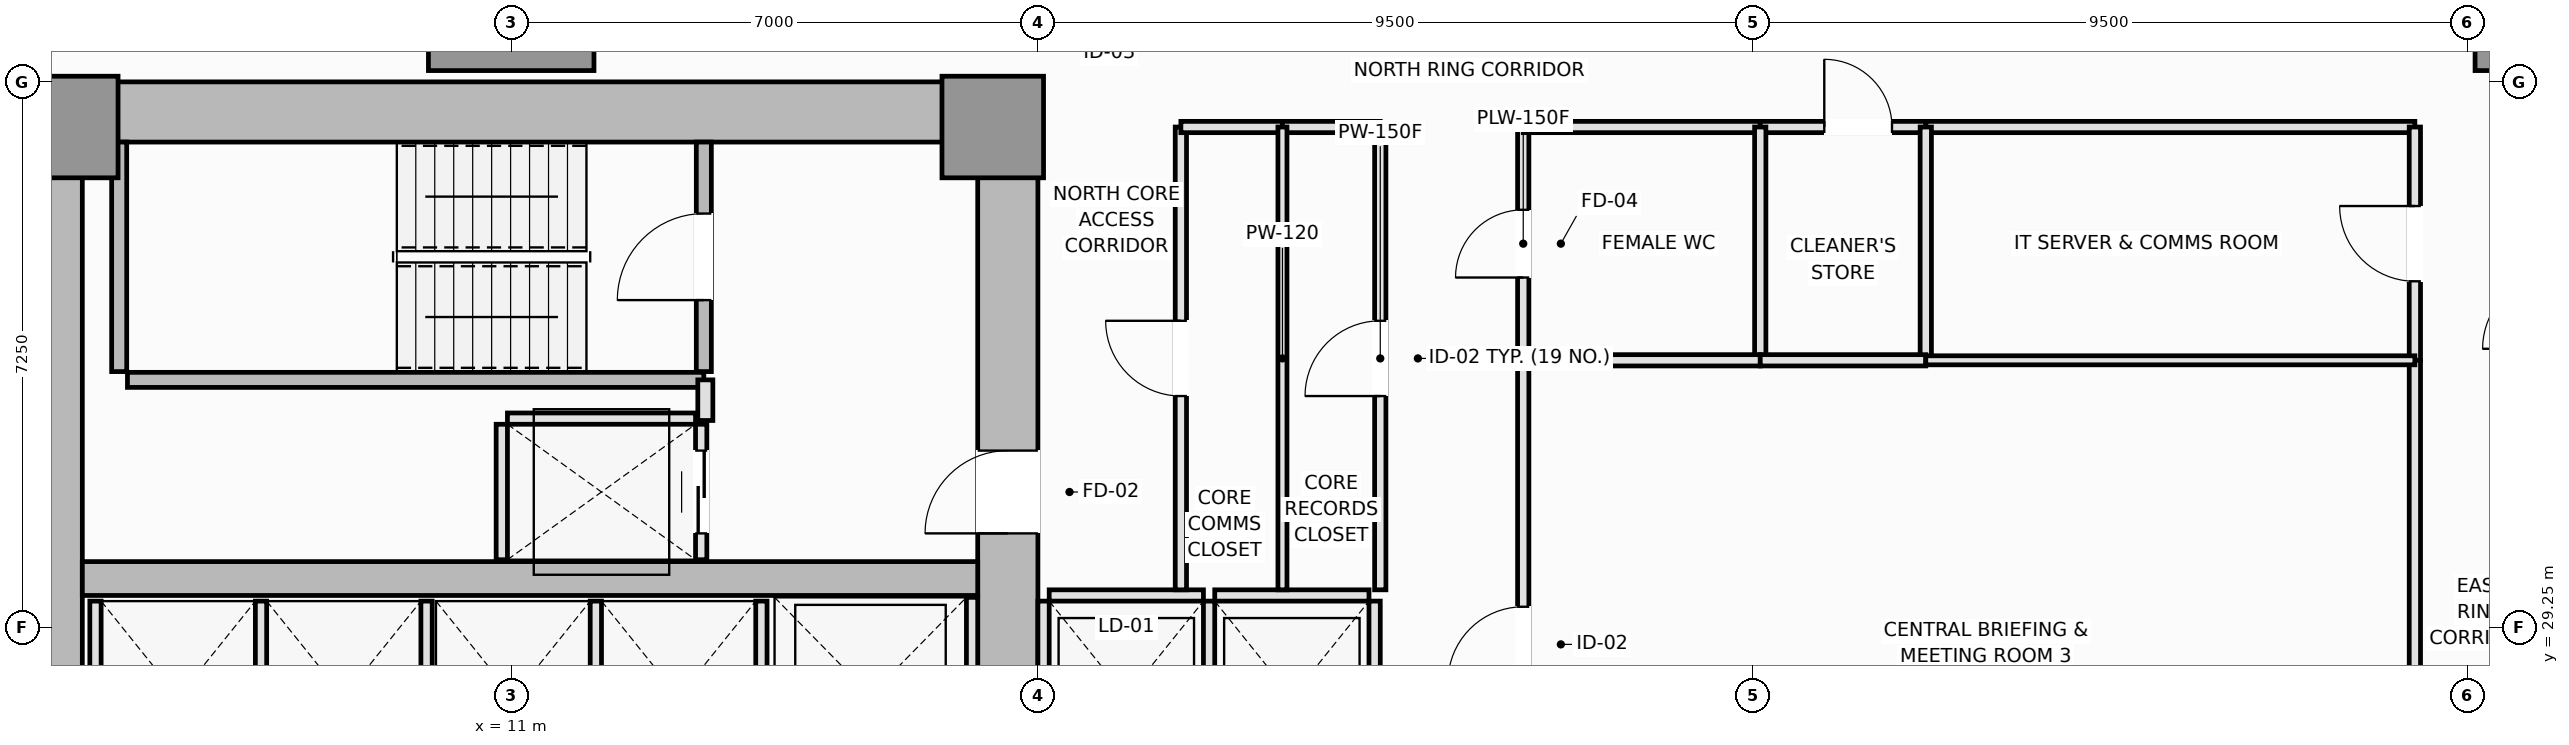
"""IFC4 building model, lengths in metres.
Left out: names, types, materials, properties, quantities, classifications, styles, units other than length and angle.
Written with IfcOpenShell. Run it as: python <this file> out.ifc"""

import sys

from ifc_helpers import new_model, si_unit, direction, frame, frame_2d, origin, origin_2d, place, context, subcontext, project, spatial, rectangle, extrude, element, fill, save


model = new_model("IFC4")
c1 = context("Model", 3, precision=1e-05, world=origin(), true_north=direction((0.0, 1.0)))
c2 = subcontext(c1, "Body", "Model", "MODEL_VIEW")
j1 = project(units=[si_unit("LENGTHUNIT", "METRE"), si_unit("PLANEANGLEUNIT", "RADIAN")], contexts=[c1])
p1 = place(None, origin())
s1 = spatial("IfcSite", under=j1, at=p1, CompositionType="ELEMENT")
p2 = place(p1, origin())
s2 = spatial("IfcBuilding", under=s1, at=p2, CompositionType="ELEMENT")
p3 = place(p2, frame((0.0, 0.0, 57.55)))
s3 = spatial("IfcBuildingStorey", under=s2, at=p3, CompositionType="ELEMENT", Elevation=57.55)
p4 = place(p3, frame((4.5, 36.1, 0.0), z_axis=(0.0, 0.0, 1.0), x_axis=(1.0, 0.0, 0.0)))
e1 = element("IfcWall", 1, at=p4, inside=s3, PredefinedType="SHEAR", context=c2, shape_type="SweptSolid", body=[
    extrude(rectangle(XDim=13.5, YDim=0.8, at=frame_2d((6.75, 0.0))), origin(), (0.0, 0.0, 1.0), 3.55),
])
p5 = place(p3, frame((4.9, 14.8, 0.0), z_axis=(0.0, 0.0, 1.0), x_axis=(0.0, 1.0, 0.0)))
e2 = element("IfcWall", 2, at=p5, inside=s3, PredefinedType="SHEAR", context=c2, shape_type="SweptSolid", body=[
    extrude(rectangle(XDim=20.9, YDim=0.8, at=frame_2d((10.45, 0.0))), origin(), (0.0, 0.0, 1.0), 3.55),
])
p6 = place(p3, frame((17.6, 27.05, 0.0), z_axis=(0.0, 0.0, 1.0), x_axis=(0.0, 1.0, 0.0)))
e3 = element("IfcWall", 3, at=p6, inside=s3, PredefinedType="SHEAR", context=c2, shape_type="SweptSolid", body=[
    extrude(rectangle(XDim=8.65, YDim=0.8, at=frame_2d((4.325, 0.0))), origin(), (0.0, 0.0, 1.0), 3.55),
])
p7 = place(p6, frame((3.45, 0.0, 0.0)))
e4 = element("IfcOpeningElement", 4, at=p7, cuts=e3, PredefinedType="OPENING", context=c2, shape_type="SweptSolid", body=[
    extrude(rectangle(XDim=1.1, YDim=2.15, at=frame_2d((0.55, 1.075))), frame((0.0, 0.41, 0.0), z_axis=(0.0, -1.0, 0.0), x_axis=(1.0, 0.0, 0.0)), (0.0, 0.0, 1.0), 0.82),
])
p8 = place(p3, frame((5.3, 29.9, 0.0), z_axis=(0.0, 0.0, 1.0), x_axis=(1.0, 0.0, 0.0)))
e5 = element("IfcWall", 5, at=p8, inside=s3, PredefinedType="SHEAR", context=c2, shape_type="SweptSolid", body=[
    extrude(rectangle(XDim=11.9, YDim=0.45, at=frame_2d((5.95, 0.0))), origin(), (0.0, 0.0, 1.0), 3.55),
])
for number, where, z_axis, x_axis in (
    (6, (5.1, 35.9, 0.0), (0.0, 0.0, 1.0), (1.0, 0.0, 0.0)),
    (7, (17.4, 35.9, 0.0), (0.0, 0.0, 1.0), (1.0, 0.0, 0.0)),
):
    element("IfcColumn", number, at=place(p3, frame(where, z_axis=z_axis, x_axis=x_axis)), inside=s3, PredefinedType="PILASTER", context=c2, shape_type="SweptSolid", body=[
        extrude(rectangle(XDim=1.35, YDim=1.35, at=origin_2d()), origin(), (0.0, 0.0, 1.0), 3.55),
    ])
for number, where, z_axis, x_axis in (
    (8, (11.0, 37.75, 0.0), (0.0, 0.0, 1.0), (1.0, 0.0, 0.0)),
    (9, (38.2, 37.75, 0.0), (0.0, 0.0, 1.0), (1.0, 0.0, 0.0)),
):
    element("IfcColumn", number, at=place(p3, frame(where, z_axis=z_axis, x_axis=x_axis)), inside=s3, PredefinedType="COLUMN", context=c2, shape_type="SweptSolid", body=[
        extrude(rectangle(XDim=2.2, YDim=2.2, at=origin_2d()), origin(), (0.0, 0.0, 1.0), 3.55),
    ])
p9 = place(p3, frame((5.79, 32.65, 0.0), z_axis=(0.0, 0.0, 1.0), x_axis=(0.0, 1.0, 0.0)))
e10 = element("IfcWall", 10, at=p9, inside=s3, PredefinedType="SOLIDWALL", context=c2, shape_type="SweptSolid", body=[
    extrude(rectangle(XDim=3.05, YDim=0.2, at=frame_2d((1.525, 0.0))), origin(), (0.0, 0.0, 1.0), 3.55),
])
p10 = place(p3, frame((5.9, 32.54, 0.0), z_axis=(0.0, 0.0, 1.0), x_axis=(1.0, 0.0, 0.0)))
e11 = element("IfcWall", 11, at=p10, inside=s3, PredefinedType="SOLIDWALL", context=c2, shape_type="SweptSolid", body=[
    extrude(rectangle(XDim=7.66, YDim=0.2, at=frame_2d((3.83, 0.0))), origin(), (0.0, 0.0, 1.0), 3.55),
])
p11 = place(p3, frame((13.56, 32.65, 0.0), z_axis=(0.0, 0.0, 1.0), x_axis=(0.0, 1.0, 0.0)))
e12 = element("IfcWall", 12, at=p11, inside=s3, PredefinedType="SOLIDWALL", context=c2, shape_type="SweptSolid", body=[
    extrude(rectangle(XDim=3.05, YDim=0.2, at=frame_2d((1.525, 0.0))), origin(), (0.0, 0.0, 1.0), 3.55),
])
p12 = place(p11, frame((0.95, 0.0, 0.0)))
e13 = element("IfcOpeningElement", 13, at=p12, cuts=e12, PredefinedType="OPENING", context=c2, shape_type="SweptSolid", body=[
    extrude(rectangle(XDim=1.15, YDim=2.15, at=frame_2d((0.575, 1.075))), frame((0.0, 0.11, 0.0), z_axis=(0.0, -1.0, 0.0), x_axis=(1.0, 0.0, 0.0)), (0.0, 0.0, 1.0), 0.22),
])
p13 = place(p3, frame((18.15, 29.675, 0.0), z_axis=(0.0, 0.0, 1.0), x_axis=(1.0, 0.0, 0.0)))
e14 = element("IfcWall", 14, at=p13, inside=s3, PredefinedType="PARTITIONING", context=c2, shape_type="SweptSolid", body=[
    extrude(rectangle(XDim=2.05, YDim=0.15, at=frame_2d((1.025, 0.0))), origin(), (0.0, 0.0, 1.0), 3.37),
])
for number, where, z_axis, x_axis in (
    (15, (18.075, 27.05, 0.0), (0.0, 0.0, 1.0), (0.0, 1.0, 0.0)),
    (16, (20.275, 27.05, 0.0), (0.0, 0.0, 1.0), (0.0, 1.0, 0.0)),
):
    element("IfcWall", number, at=place(p3, frame(where, z_axis=z_axis, x_axis=x_axis)), inside=s3, PredefinedType="PARTITIONING", context=c2, shape_type="SweptSolid", body=[
        extrude(rectangle(XDim=2.55, YDim=0.15, at=frame_2d((1.275, 0.0))), origin(), (0.0, 0.0, 1.0), 3.37),
    ])
p14 = place(p3, frame((20.35, 29.675, 0.0), z_axis=(0.0, 0.0, 1.0), x_axis=(1.0, 0.0, 0.0)))
e17 = element("IfcWall", 17, at=p14, inside=s3, PredefinedType="PARTITIONING", context=c2, shape_type="SweptSolid", body=[
    extrude(rectangle(XDim=2.05, YDim=0.15, at=frame_2d((1.025, 0.0))), origin(), (0.0, 0.0, 1.0), 3.37),
])
for number, where, z_axis, x_axis in (
    (18, (22.475, 27.05, 0.0), (0.0, 0.0, 1.0), (0.0, 1.0, 0.0)),
    (19, (5.475, 27.05, 0.0), (0.0, 0.0, 1.0), (0.0, 1.0, 0.0)),
    (20, (7.675, 27.05, 0.0), (0.0, 0.0, 1.0), (0.0, 1.0, 0.0)),
    (21, (9.875, 27.05, 0.0), (0.0, 0.0, 1.0), (0.0, 1.0, 0.0)),
    (22, (12.125, 27.05, 0.0), (0.0, 0.0, 1.0), (0.0, 1.0, 0.0)),
    (23, (14.325, 27.05, 0.0), (0.0, 0.0, 1.0), (0.0, 1.0, 0.0)),
):
    element("IfcWall", number, at=place(p3, frame(where, z_axis=z_axis, x_axis=x_axis)), inside=s3, PredefinedType="PARTITIONING", context=c2, shape_type="SweptSolid", body=[
        extrude(rectangle(XDim=2.55, YDim=0.15, at=frame_2d((1.275, 0.0))), origin(), (0.0, 0.0, 1.0), 3.37),
    ])
p15 = place(p3, frame((17.125, 27.05, 0.0), z_axis=(0.0, 0.0, 1.0), x_axis=(0.0, 1.0, 0.0)))
e24 = element("IfcWall", 24, at=p15, inside=s3, PredefinedType="PARTITIONING", context=c2, shape_type="SweptSolid", body=[
    extrude(rectangle(XDim=2.6, YDim=0.15, at=frame_2d((1.3, 0.0))), origin(), (0.0, 0.0, 1.0), 3.37),
])
p16 = place(p3, frame((10.95, 32.025, 0.0), z_axis=(0.0, 0.0, 1.0), x_axis=(1.0, 0.0, 0.0)))
e25 = element("IfcWall", 25, at=p16, inside=s3, PredefinedType="PARTITIONING", context=c2, shape_type="SweptSolid", body=[
    extrude(rectangle(XDim=2.5, YDim=0.15, at=frame_2d((1.25, 0.0))), origin(), (0.0, 0.0, 1.0), 3.37),
])
p17 = place(p3, frame((10.875, 30.15, 0.0), z_axis=(0.0, 0.0, 1.0), x_axis=(0.0, 1.0, 0.0)))
e26 = element("IfcWall", 26, at=p17, inside=s3, PredefinedType="PARTITIONING", context=c2, shape_type="SweptSolid", body=[
    extrude(rectangle(XDim=1.8, YDim=0.15, at=frame_2d((0.9, 0.0))), origin(), (0.0, 0.0, 1.0), 3.37),
])
p18 = place(p3, frame((13.525, 30.15, 0.0), z_axis=(0.0, 0.0, 1.0), x_axis=(0.0, 1.0, 0.0)))
e27 = element("IfcWall", 27, at=p18, inside=s3, PredefinedType="PARTITIONING", context=c2, shape_type="SweptSolid", body=[
    extrude(rectangle(XDim=1.8, YDim=0.15, at=frame_2d((0.9, 0.0))), origin(), (0.0, 0.0, 1.0), 3.37),
])
p19 = place(p18, frame((0.35, 0.0, 0.0)))
e28 = element("IfcOpeningElement", 28, at=p19, cuts=e27, PredefinedType="OPENING", context=c2, shape_type="SweptSolid", body=[
    extrude(rectangle(XDim=1.1, YDim=2.2, at=frame_2d((0.55, 1.1))), frame((0.0, 0.085, 0.0), z_axis=(0.0, -1.0, 0.0), x_axis=(1.0, 0.0, 0.0)), (0.0, 0.0, 1.0), 0.17),
])
p20 = place(p3, frame((13.58, 32.0, 0.0), z_axis=(0.0, 0.0, 1.0), x_axis=(0.0, 1.0, 0.0)))
e29 = element("IfcWall", 29, at=p20, inside=s3, PredefinedType="PARTITIONING", context=c2, shape_type="SweptSolid", body=[
    extrude(rectangle(XDim=0.54, YDim=0.2, at=frame_2d((0.27, 0.0))), origin(), (0.0, 0.0, 1.0), 3.37),
])
p21 = place(p3, frame((22.55, 29.75, 0.0), z_axis=(0.0, 0.0, 1.0), x_axis=(0.0, 1.0, 0.0)))
e30 = element("IfcWall", 30, at=p21, inside=s3, PredefinedType="PARTITIONING", context=c2, shape_type="SweptSolid", body=[
    extrude(rectangle(XDim=6.15, YDim=0.15, at=frame_2d((3.075, 0.0))), origin(), (0.0, 0.0, 1.0), 3.01),
])
p22 = place(p21, frame((2.575, 0.0, 0.0)))
e31 = element("IfcOpeningElement", 31, at=p22, cuts=e30, PredefinedType="OPENING", context=c2, shape_type="SweptSolid", body=[
    extrude(rectangle(XDim=1.0, YDim=2.15, at=frame_2d((0.5, 1.075))), frame((0.0, 0.085, 0.0), z_axis=(0.0, -1.0, 0.0), x_axis=(1.0, 0.0, 0.0)), (0.0, 0.0, 1.0), 0.17),
])
p23 = place(p3, frame((24.45, 32.8, 0.0), z_axis=(0.0, 0.0, 1.0), x_axis=(0.0, 1.0, 0.0)))
e32 = element("IfcWall", 32, at=p23, inside=s3, PredefinedType="PLUMBINGWALL", context=c2, shape_type="SweptSolid", body=[
    extrude(rectangle(XDim=3.1, YDim=0.15, at=frame_2d((1.55, 0.0))), origin(), (0.0, 0.0, 1.0), 3.37),
])
p24 = place(p23, frame((1.1, 0.0, 0.0)))
e33 = element("IfcOpeningElement", 33, at=p24, cuts=e32, PredefinedType="OPENING", context=c2, shape_type="SweptSolid", body=[
    extrude(rectangle(XDim=0.9, YDim=2.1, at=frame_2d((0.45, 1.05))), frame((0.0, 0.085, 0.0), z_axis=(0.0, -1.0, 0.0), x_axis=(1.0, 0.0, 0.0)), (0.0, 0.0, 1.0), 0.17),
])
p25 = place(p3, frame((24.45, 25.25, 0.0), z_axis=(0.0, 0.0, 1.0), x_axis=(0.0, 1.0, 0.0)))
e34 = element("IfcWall", 34, at=p25, inside=s3, PredefinedType="PARTITIONING", context=c2, shape_type="SweptSolid", body=[
    extrude(rectangle(XDim=7.55, YDim=0.15, at=frame_2d((3.775, 0.0))), origin(), (0.0, 0.0, 1.0), 3.37),
])
p26 = place(p25, frame((3.275, 0.0, 0.0)))
e35 = element("IfcOpeningElement", 35, at=p26, cuts=e34, PredefinedType="OPENING", context=c2, shape_type="SweptSolid", body=[
    extrude(rectangle(XDim=1.0, YDim=2.15, at=frame_2d((0.5, 1.075))), frame((0.0, 0.085, 0.0), z_axis=(0.0, -1.0, 0.0), x_axis=(1.0, 0.0, 0.0)), (0.0, 0.0, 1.0), 0.17),
])
p27 = place(p3, frame((19.9, 29.75, 0.0), z_axis=(0.0, 0.0, 1.0), x_axis=(0.0, 1.0, 0.0)))
e36 = element("IfcWall", 36, at=p27, inside=s3, PredefinedType="PARTITIONING", context=c2, shape_type="SweptSolid", body=[
    extrude(rectangle(XDim=6.15, YDim=0.15, at=frame_2d((3.075, 0.0))), origin(), (0.0, 0.0, 1.0), 3.37),
])
p28 = place(p27, frame((2.575, 0.0, 0.0)))
e37 = element("IfcOpeningElement", 37, at=p28, cuts=e36, PredefinedType="OPENING", context=c2, shape_type="SweptSolid", body=[
    extrude(rectangle(XDim=1.0, YDim=2.15, at=frame_2d((0.5, 1.075))), frame((0.0, 0.085, 0.0), z_axis=(0.0, -1.0, 0.0), x_axis=(1.0, 0.0, 0.0)), (0.0, 0.0, 1.0), 0.17),
])
p29 = place(p3, frame((19.9, 35.9, 0.0), z_axis=(0.0, 0.0, 1.0), x_axis=(1.0, 0.0, 0.0)))
e38 = element("IfcWall", 38, at=p29, inside=s3, PredefinedType="PARTITIONING", context=c2, shape_type="SweptSolid", body=[
    extrude(rectangle(XDim=1.35, YDim=0.15, at=frame_2d((0.675, 0.0))), origin(), (0.0, 0.0, 1.0), 3.37),
])
p30 = place(p3, frame((21.25, 35.9, 0.0), z_axis=(0.0, 0.0, 1.0), x_axis=(1.0, 0.0, 0.0)))
e39 = element("IfcWall", 39, at=p30, inside=s3, PredefinedType="PARTITIONING", context=c2, shape_type="SweptSolid", body=[
    extrude(rectangle(XDim=1.3, YDim=0.15, at=frame_2d((0.65, 0.0))), origin(), (0.0, 0.0, 1.0), 3.37),
])
p31 = place(p3, frame((24.45, 35.9, 0.0), z_axis=(0.0, 0.0, 1.0), x_axis=(1.0, 0.0, 0.0)))
e40 = element("IfcWall", 40, at=p31, inside=s3, PredefinedType="PLUMBINGWALL", context=c2, shape_type="SweptSolid", body=[
    extrude(rectangle(XDim=3.15, YDim=0.15, at=frame_2d((1.575, 0.0))), origin(), (0.0, 0.0, 1.0), 3.37),
])
p32 = place(p3, frame((27.6, 35.9, 0.0), z_axis=(0.0, 0.0, 1.0), x_axis=(1.0, 0.0, 0.0)))
e41 = element("IfcWall", 41, at=p32, inside=s3, PredefinedType="PLUMBINGWALL", context=c2, shape_type="SweptSolid", body=[
    extrude(rectangle(XDim=2.2, YDim=0.15, at=frame_2d((1.1, 0.0))), origin(), (0.0, 0.0, 1.0), 3.37),
])
p33 = place(p32, frame((0.851, 0.0, 0.0)))
e42 = element("IfcOpeningElement", 42, at=p33, cuts=e41, PredefinedType="OPENING", context=c2, shape_type="SweptSolid", body=[
    extrude(rectangle(XDim=0.9, YDim=2.1, at=frame_2d((0.45, 1.05))), frame((0.0, 0.085, 0.0), z_axis=(0.0, -1.0, 0.0), x_axis=(1.0, 0.0, 0.0)), (0.0, 0.0, 1.0), 0.17),
])
p34 = place(p3, frame((29.8, 35.9, 0.0), z_axis=(0.0, 0.0, 1.0), x_axis=(1.0, 0.0, 0.0)))
e43 = element("IfcWall", 43, at=p34, inside=s3, PredefinedType="PARTITIONING", context=c2, shape_type="SweptSolid", body=[
    extrude(rectangle(XDim=6.5, YDim=0.15, at=frame_2d((3.25, 0.0))), origin(), (0.0, 0.0, 1.0), 3.37),
])
p35 = place(p3, frame((36.3, 32.8, 0.0), z_axis=(0.0, 0.0, 1.0), x_axis=(0.0, 1.0, 0.0)))
e44 = element("IfcWall", 44, at=p35, inside=s3, PredefinedType="PARTITIONING", context=c2, shape_type="SweptSolid", body=[
    extrude(rectangle(XDim=3.1, YDim=0.15, at=frame_2d((1.55, 0.0))), origin(), (0.0, 0.0, 1.0), 3.37),
])
p36 = place(p35, frame((1.05, 0.0, 0.0)))
e45 = element("IfcOpeningElement", 45, at=p36, cuts=e44, PredefinedType="OPENING", context=c2, shape_type="SweptSolid", body=[
    extrude(rectangle(XDim=1.0, YDim=2.15, at=frame_2d((0.5, 1.075))), frame((0.0, 0.085, 0.0), z_axis=(0.0, -1.0, 0.0), x_axis=(1.0, 0.0, 0.0)), (0.0, 0.0, 1.0), 0.17),
])
p37 = place(p3, frame((36.3, 25.25, 0.0), z_axis=(0.0, 0.0, 1.0), x_axis=(0.0, 1.0, 0.0)))
e46 = element("IfcWall", 46, at=p37, inside=s3, PredefinedType="PARTITIONING", context=c2, shape_type="SweptSolid", body=[
    extrude(rectangle(XDim=7.55, YDim=0.15, at=frame_2d((3.775, 0.0))), origin(), (0.0, 0.0, 1.0), 3.37),
])
p38 = place(p3, frame((21.25, 29.75, 0.0), z_axis=(0.0, 0.0, 1.0), x_axis=(0.0, 1.0, 0.0)))
e47 = element("IfcWall", 47, at=p38, inside=s3, PredefinedType="PARTITIONING", context=c2, shape_type="SweptSolid", body=[
    extrude(rectangle(XDim=6.15, YDim=0.12, at=frame_2d((3.075, 0.0))), origin(), (0.0, 0.0, 1.0), 3.37),
])
p39 = place(p3, frame((27.6, 32.8, 0.0), z_axis=(0.0, 0.0, 1.0), x_axis=(0.0, 1.0, 0.0)))
e48 = element("IfcWall", 48, at=p39, inside=s3, PredefinedType="PLUMBINGWALL", context=c2, shape_type="SweptSolid", body=[
    extrude(rectangle(XDim=3.1, YDim=0.15, at=frame_2d((1.55, 0.0))), origin(), (0.0, 0.0, 1.0), 3.37),
])
p40 = place(p3, frame((24.45, 32.8, 0.0), z_axis=(0.0, 0.0, 1.0), x_axis=(1.0, 0.0, 0.0)))
e49 = element("IfcWall", 49, at=p40, inside=s3, PredefinedType="PLUMBINGWALL", context=c2, shape_type="SweptSolid", body=[
    extrude(rectangle(XDim=3.15, YDim=0.15, at=frame_2d((1.575, 0.0))), origin(), (0.0, 0.0, 1.0), 3.37),
])
p41 = place(p3, frame((29.8, 32.8, 0.0), z_axis=(0.0, 0.0, 1.0), x_axis=(0.0, 1.0, 0.0)))
e50 = element("IfcWall", 50, at=p41, inside=s3, PredefinedType="PLUMBINGWALL", context=c2, shape_type="SweptSolid", body=[
    extrude(rectangle(XDim=3.1, YDim=0.15, at=frame_2d((1.55, 0.0))), origin(), (0.0, 0.0, 1.0), 3.37),
])
p42 = place(p3, frame((27.6, 32.8, 0.0), z_axis=(0.0, 0.0, 1.0), x_axis=(1.0, 0.0, 0.0)))
e51 = element("IfcWall", 51, at=p42, inside=s3, PredefinedType="PLUMBINGWALL", context=c2, shape_type="SweptSolid", body=[
    extrude(rectangle(XDim=2.2, YDim=0.15, at=frame_2d((1.1, 0.0))), origin(), (0.0, 0.0, 1.0), 3.37),
])
p43 = place(p3, frame((29.8, 32.8, 0.0), z_axis=(0.0, 0.0, 1.0), x_axis=(1.0, 0.0, 0.0)))
e52 = element("IfcWall", 52, at=p43, inside=s3, PredefinedType="PARTITIONING", context=c2, shape_type="SweptSolid", body=[
    extrude(rectangle(XDim=6.5, YDim=0.12, at=frame_2d((3.25, 0.0))), origin(), (0.0, 0.0, 1.0), 3.37),
])
p44 = place(p12, origin())
e53 = element("IfcDoor", 53, at=p44, inside=s3, OperationType="SINGLE_SWING_LEFT", PredefinedType="DOOR", context=c2, shape_type="SweptSolid", body=[
    extrude(rectangle(XDim=1.15, YDim=2.15, at=frame_2d((0.575, 1.075))), frame((0.0, 0.025, 0.0), z_axis=(0.0, -1.0, 0.0), x_axis=(1.0, 0.0, 0.0)), (0.0, 0.0, 1.0), 0.05),
])
fill(e13, e53)
p45 = place(p19, origin())
e54 = element("IfcDoor", 54, at=p45, inside=s3, OperationType="DOUBLE_DOOR_SLIDING", PredefinedType="DOOR", context=c2, shape_type="SweptSolid", body=[
    extrude(rectangle(XDim=1.1, YDim=2.2, at=frame_2d((0.55, 1.1))), frame((0.0, 0.025, 0.0), z_axis=(0.0, -1.0, 0.0), x_axis=(1.0, 0.0, 0.0)), (0.0, 0.0, 1.0), 0.05),
])
fill(e28, e54)
p46 = place(p7, origin())
e55 = element("IfcDoor", 55, at=p46, inside=s3, OperationType="SINGLE_SWING_LEFT", PredefinedType="DOOR", context=c2, shape_type="SweptSolid", body=[
    extrude(rectangle(XDim=1.1, YDim=2.15, at=frame_2d((0.55, 1.075))), frame((0.0, 0.025, 0.0), z_axis=(0.0, -1.0, 0.0), x_axis=(1.0, 0.0, 0.0)), (0.0, 0.0, 1.0), 0.05),
])
fill(e4, e55)
p47 = place(p22, origin())
e56 = element("IfcDoor", 56, at=p47, inside=s3, OperationType="SINGLE_SWING_LEFT", PredefinedType="DOOR", context=c2, shape_type="SweptSolid", body=[
    extrude(rectangle(XDim=1.0, YDim=2.15, at=frame_2d((0.5, 1.075))), frame((0.0, 0.025, 0.0), z_axis=(0.0, -1.0, 0.0), x_axis=(1.0, 0.0, 0.0)), (0.0, 0.0, 1.0), 0.05),
])
fill(e31, e56)
p48 = place(p24, origin())
e57 = element("IfcDoor", 57, at=p48, inside=s3, OperationType="SINGLE_SWING_LEFT", PredefinedType="DOOR", context=c2, shape_type="SweptSolid", body=[
    extrude(rectangle(XDim=0.9, YDim=2.1, at=frame_2d((0.45, 1.05))), frame((0.0, 0.025, 0.0), z_axis=(0.0, -1.0, 0.0), x_axis=(1.0, 0.0, 0.0)), (0.0, 0.0, 1.0), 0.05),
])
fill(e33, e57)
p49 = place(p26, origin())
e58 = element("IfcDoor", 58, at=p49, inside=s3, OperationType="SINGLE_SWING_LEFT", PredefinedType="DOOR", context=c2, shape_type="SweptSolid", body=[
    extrude(rectangle(XDim=1.0, YDim=2.15, at=frame_2d((0.5, 1.075))), frame((0.0, 0.025, 0.0), z_axis=(0.0, -1.0, 0.0), x_axis=(1.0, 0.0, 0.0)), (0.0, 0.0, 1.0), 0.05),
])
fill(e35, e58)
p50 = place(p28, origin())
e59 = element("IfcDoor", 59, at=p50, inside=s3, OperationType="SINGLE_SWING_RIGHT", PredefinedType="DOOR", context=c2, shape_type="SweptSolid", body=[
    extrude(rectangle(XDim=1.0, YDim=2.15, at=frame_2d((0.5, 1.075))), frame((0.0, 0.025, 0.0), z_axis=(0.0, -1.0, 0.0), x_axis=(1.0, 0.0, 0.0)), (0.0, 0.0, 1.0), 0.05),
])
fill(e37, e59)
p51 = place(p33, origin())
e60 = element("IfcDoor", 60, at=p51, inside=s3, OperationType="SINGLE_SWING_LEFT", PredefinedType="DOOR", context=c2, shape_type="SweptSolid", body=[
    extrude(rectangle(XDim=0.9, YDim=2.1, at=frame_2d((0.45, 1.05))), frame((0.0, 0.025, 0.0), z_axis=(0.0, -1.0, 0.0), x_axis=(1.0, 0.0, 0.0)), (0.0, 0.0, 1.0), 0.05),
])
fill(e42, e60)
p52 = place(p36, origin())
e61 = element("IfcDoor", 61, at=p52, inside=s3, OperationType="SINGLE_SWING_RIGHT", PredefinedType="DOOR", context=c2, shape_type="SweptSolid", body=[
    extrude(rectangle(XDim=1.0, YDim=2.15, at=frame_2d((0.5, 1.075))), frame((0.0, 0.025, 0.0), z_axis=(0.0, -1.0, 0.0), x_axis=(1.0, 0.0, 0.0)), (0.0, 0.0, 1.0), 0.05),
])
fill(e45, e61)
save(model, sys.argv[1])
